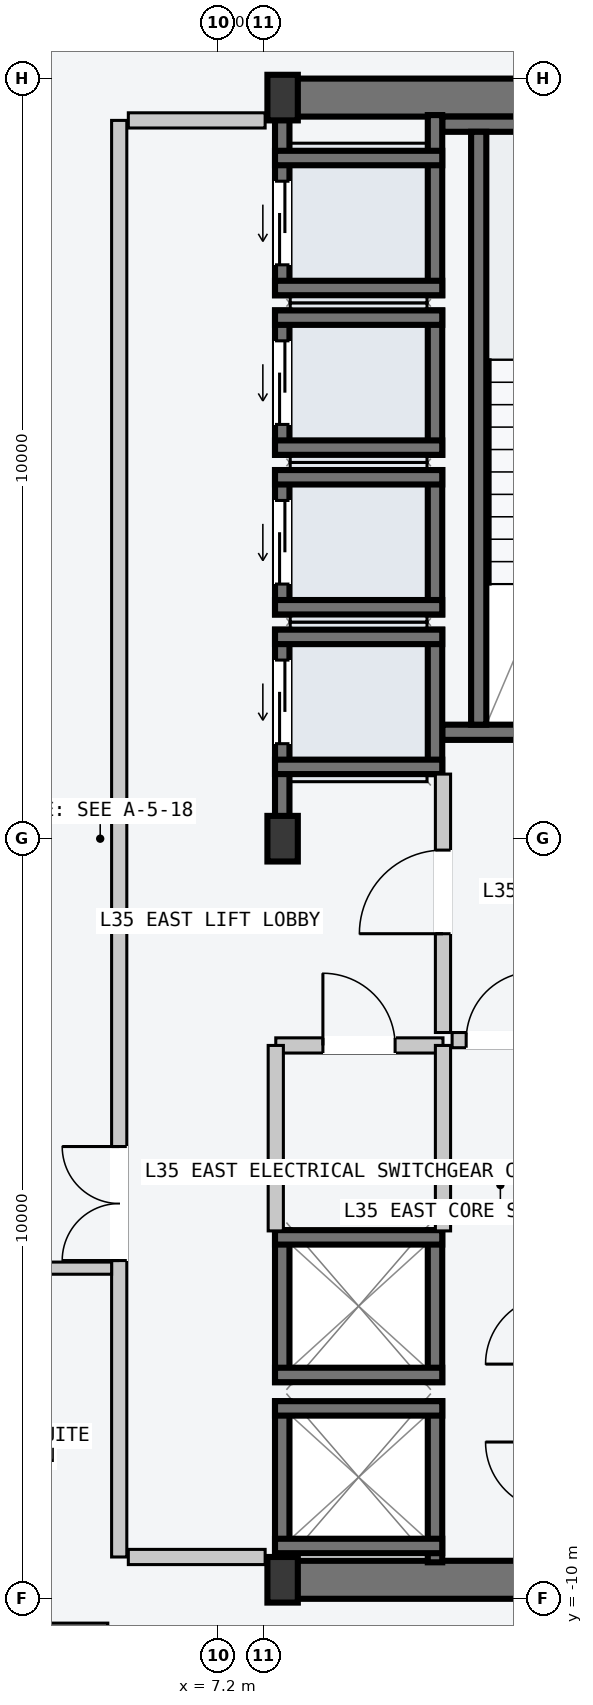
"""IFC4 building model, lengths in metres.
Left out: names, types, materials, properties, quantities, classifications, styles, units other than length and angle.
Written with IfcOpenShell. Run it as: python <this file> out.ifc"""

import sys

from ifc_helpers import new_model, si_unit, direction, frame, frame_2d, origin, origin_2d, place, context, subcontext, project, spatial, rectangle, i_section, extrude, element, fill, save


model = new_model("IFC4")
c1 = context("Model", 3, precision=1e-05, world=origin(), true_north=direction((0.0, 1.0)))
c2 = subcontext(c1, "Body", "Model", "MODEL_VIEW")
j1 = project(units=[si_unit("LENGTHUNIT", "METRE"), si_unit("PLANEANGLEUNIT", "RADIAN")], contexts=[c1])
p1 = place(None, origin())
s1 = spatial("IfcSite", under=j1, at=p1, CompositionType="ELEMENT")
p2 = place(p1, origin())
s2 = spatial("IfcBuilding", under=s1, at=p2, CompositionType="ELEMENT")
p3 = place(p2, frame((0.0, 0.0, 135.0)))
s3 = spatial("IfcBuildingStorey", under=s2, at=p3, CompositionType="ELEMENT", Elevation=135.0)
for number, where, z_axis, x_axis in (
    (1, (8.07, -9.75, -0.2), (0.0, 0.0, 1.0), (1.0, 0.0, 0.0)),
    (2, (8.07, 9.75, -0.2), (0.0, 0.0, 1.0), (1.0, 0.0, 0.0)),
):
    element("IfcWall", number, at=place(p3, frame(where, z_axis=z_axis, x_axis=x_axis)), inside=s3, PredefinedType="SHEAR", context=c2, shape_type="SweptSolid", body=[
        extrude(rectangle(XDim=6.46, YDim=0.5, at=frame_2d((3.23, 0.0))), origin(), (0.0, 0.0, 1.0), 3.6),
    ])
p4 = place(p3, frame((10.15, 1.4, -0.2), z_axis=(0.0, 0.0, 1.0), x_axis=(1.0, 0.0, 0.0)))
e3 = element("IfcWall", 3, at=p4, inside=s3, PredefinedType="SOLIDWALL", context=c2, shape_type="SweptSolid", body=[
    extrude(rectangle(XDim=4.1, YDim=0.2, at=frame_2d((2.05, 0.0))), origin(), (0.0, 0.0, 1.0), 3.6),
])
p5 = place(p4, frame((1.5, 0.0, 0.2)))
e4 = element("IfcOpeningElement", 4, at=p5, cuts=e3, PredefinedType="OPENING", context=c2, shape_type="SweptSolid", body=[
    extrude(rectangle(XDim=1.12, YDim=2.18, at=frame_2d((0.56, 1.09))), frame((0.0, 0.11, 0.0), z_axis=(0.0, -1.0, 0.0), x_axis=(1.0, 0.0, 0.0)), (0.0, 0.0, 1.0), 0.22),
])
p6 = place(p3, frame((10.15, 9.4, -0.2), z_axis=(0.0, 0.0, 1.0), x_axis=(1.0, 0.0, 0.0)))
e5 = element("IfcWall", 5, at=p6, inside=s3, PredefinedType="SOLIDWALL", context=c2, shape_type="SweptSolid", body=[
    extrude(rectangle(XDim=4.1, YDim=0.2, at=frame_2d((2.05, 0.0))), origin(), (0.0, 0.0, 1.0), 3.6),
])
p7 = place(p3, frame((10.63, 1.5, -0.2), z_axis=(0.0, 0.0, 1.0), x_axis=(0.0, 1.0, 0.0)))
e6 = element("IfcWall", 6, at=p7, inside=s3, PredefinedType="SOLIDWALL", context=c2, shape_type="SweptSolid", body=[
    extrude(rectangle(XDim=7.8, YDim=0.2, at=frame_2d((3.9, 0.0))), origin(), (0.0, 0.0, 1.0), 3.6),
])
for number, where, z_axis, x_axis in (
    (7, (8.05, -9.75, 0.0), (0.0, 0.0, 1.0), (1.0, 0.0, 0.0)),
    (8, (8.05, 0.0, 0.0), (0.0, 0.0, 1.0), (1.0, 0.0, 0.0)),
    (9, (8.05, 9.75, 0.0), (0.0, 0.0, 1.0), (1.0, 0.0, 0.0)),
):
    element("IfcColumn", number, at=place(p3, frame(where, z_axis=z_axis, x_axis=x_axis)), inside=s3, PredefinedType="COLUMN", context=c2, shape_type="SweptSolid", body=[
        extrude(i_section(OverallWidth=0.4, OverallDepth=0.6, WebThickness=0.022, FlangeThickness=0.036, at=origin_2d()), origin(), (0.0, 0.0, 1.0), 3.6),
    ])
p8 = place(p3, frame((8.045, 0.21, -0.2), z_axis=(0.0, 0.0, 1.0), x_axis=(0.0, 1.0, 0.0)))
e10 = element("IfcWall", 10, at=p8, inside=s3, PredefinedType="SOLIDWALL", context=c2, shape_type="SweptSolid", body=[
    extrude(rectangle(XDim=2.54, YDim=0.19, at=frame_2d((1.27, 0.0))), origin(), (0.0, 0.0, 1.0), 3.6),
])
p9 = place(p8, frame((1.04, 0.0, 0.2)))
e11 = element("IfcOpeningElement", 11, at=p9, cuts=e10, PredefinedType="OPENING", context=c2, shape_type="SweptSolid", body=[
    extrude(rectangle(XDim=1.1, YDim=2.2, at=frame_2d((0.55, 1.1))), frame((0.0, 0.105, 0.0), z_axis=(0.0, -1.0, 0.0), x_axis=(1.0, 0.0, 0.0)), (0.0, 0.0, 1.0), 0.21),
])
p10 = place(p3, frame((10.055, 0.85, -0.2), z_axis=(0.0, 0.0, 1.0), x_axis=(0.0, 1.0, 0.0)))
e12 = element("IfcWall", 12, at=p10, inside=s3, PredefinedType="SOLIDWALL", context=c2, shape_type="SweptSolid", body=[
    extrude(rectangle(XDim=1.9, YDim=0.19, at=frame_2d((0.95, 0.0))), origin(), (0.0, 0.0, 1.0), 3.6),
])
for number, where, z_axis, x_axis in (
    (13, (7.95, 2.655, -0.2), (0.0, 0.0, 1.0), (1.0, 0.0, 0.0)),
    (14, (7.95, 0.945, -0.2), (0.0, 0.0, 1.0), (1.0, 0.0, 0.0)),
):
    element("IfcWall", number, at=place(p3, frame(where, z_axis=z_axis, x_axis=x_axis)), inside=s3, PredefinedType="SOLIDWALL", context=c2, shape_type="SweptSolid", body=[
        extrude(rectangle(XDim=2.2, YDim=0.19, at=frame_2d((1.1, 0.0))), origin(), (0.0, 0.0, 1.0), 3.6),
    ])
p11 = place(p3, frame((8.045, 2.95, -0.2), z_axis=(0.0, 0.0, 1.0), x_axis=(0.0, 1.0, 0.0)))
e15 = element("IfcWall", 15, at=p11, inside=s3, PredefinedType="SOLIDWALL", context=c2, shape_type="SweptSolid", body=[
    extrude(rectangle(XDim=1.9, YDim=0.19, at=frame_2d((0.95, 0.0))), origin(), (0.0, 0.0, 1.0), 3.6),
])
p12 = place(p11, frame((0.4, 0.0, 0.2)))
e16 = element("IfcOpeningElement", 16, at=p12, cuts=e15, PredefinedType="OPENING", context=c2, shape_type="SweptSolid", body=[
    extrude(rectangle(XDim=1.1, YDim=2.2, at=frame_2d((0.55, 1.1))), frame((0.0, 0.105, 0.0), z_axis=(0.0, -1.0, 0.0), x_axis=(1.0, 0.0, 0.0)), (0.0, 0.0, 1.0), 0.21),
])
p13 = place(p3, frame((10.055, 2.95, -0.2), z_axis=(0.0, 0.0, 1.0), x_axis=(0.0, 1.0, 0.0)))
e17 = element("IfcWall", 17, at=p13, inside=s3, PredefinedType="SOLIDWALL", context=c2, shape_type="SweptSolid", body=[
    extrude(rectangle(XDim=1.9, YDim=0.19, at=frame_2d((0.95, 0.0))), origin(), (0.0, 0.0, 1.0), 3.6),
])
for number, where, z_axis, x_axis in (
    (18, (7.95, 4.755, -0.2), (0.0, 0.0, 1.0), (1.0, 0.0, 0.0)),
    (19, (7.95, 3.045, -0.2), (0.0, 0.0, 1.0), (1.0, 0.0, 0.0)),
):
    element("IfcWall", number, at=place(p3, frame(where, z_axis=z_axis, x_axis=x_axis)), inside=s3, PredefinedType="SOLIDWALL", context=c2, shape_type="SweptSolid", body=[
        extrude(rectangle(XDim=2.2, YDim=0.19, at=frame_2d((1.1, 0.0))), origin(), (0.0, 0.0, 1.0), 3.6),
    ])
p14 = place(p3, frame((8.045, 5.05, -0.2), z_axis=(0.0, 0.0, 1.0), x_axis=(0.0, 1.0, 0.0)))
e20 = element("IfcWall", 20, at=p14, inside=s3, PredefinedType="SOLIDWALL", context=c2, shape_type="SweptSolid", body=[
    extrude(rectangle(XDim=1.9, YDim=0.19, at=frame_2d((0.95, 0.0))), origin(), (0.0, 0.0, 1.0), 3.6),
])
p15 = place(p14, frame((0.4, 0.0, 0.2)))
e21 = element("IfcOpeningElement", 21, at=p15, cuts=e20, PredefinedType="OPENING", context=c2, shape_type="SweptSolid", body=[
    extrude(rectangle(XDim=1.1, YDim=2.2, at=frame_2d((0.55, 1.1))), frame((0.0, 0.105, 0.0), z_axis=(0.0, -1.0, 0.0), x_axis=(1.0, 0.0, 0.0)), (0.0, 0.0, 1.0), 0.21),
])
p16 = place(p3, frame((10.055, 5.05, -0.2), z_axis=(0.0, 0.0, 1.0), x_axis=(0.0, 1.0, 0.0)))
e22 = element("IfcWall", 22, at=p16, inside=s3, PredefinedType="SOLIDWALL", context=c2, shape_type="SweptSolid", body=[
    extrude(rectangle(XDim=1.9, YDim=0.19, at=frame_2d((0.95, 0.0))), origin(), (0.0, 0.0, 1.0), 3.6),
])
for number, where, z_axis, x_axis in (
    (23, (7.95, 6.855, -0.2), (0.0, 0.0, 1.0), (1.0, 0.0, 0.0)),
    (24, (7.95, 5.145, -0.2), (0.0, 0.0, 1.0), (1.0, 0.0, 0.0)),
):
    element("IfcWall", number, at=place(p3, frame(where, z_axis=z_axis, x_axis=x_axis)), inside=s3, PredefinedType="SOLIDWALL", context=c2, shape_type="SweptSolid", body=[
        extrude(rectangle(XDim=2.2, YDim=0.19, at=frame_2d((1.1, 0.0))), origin(), (0.0, 0.0, 1.0), 3.6),
    ])
p17 = place(p3, frame((8.045, 7.15, -0.2), z_axis=(0.0, 0.0, 1.0), x_axis=(0.0, 1.0, 0.0)))
e25 = element("IfcWall", 25, at=p17, inside=s3, PredefinedType="SOLIDWALL", context=c2, shape_type="SweptSolid", body=[
    extrude(rectangle(XDim=2.37, YDim=0.19, at=frame_2d((1.185, 0.0))), origin(), (0.0, 0.0, 1.0), 3.6),
])
p18 = place(p17, frame((0.4, 0.0, 0.2)))
e26 = element("IfcOpeningElement", 26, at=p18, cuts=e25, PredefinedType="OPENING", context=c2, shape_type="SweptSolid", body=[
    extrude(rectangle(XDim=1.1, YDim=2.2, at=frame_2d((0.55, 1.1))), frame((0.0, 0.105, 0.0), z_axis=(0.0, -1.0, 0.0), x_axis=(1.0, 0.0, 0.0)), (0.0, 0.0, 1.0), 0.21),
])
p19 = place(p3, frame((10.055, 7.15, -0.2), z_axis=(0.0, 0.0, 1.0), x_axis=(0.0, 1.0, 0.0)))
e27 = element("IfcWall", 27, at=p19, inside=s3, PredefinedType="SOLIDWALL", context=c2, shape_type="SweptSolid", body=[
    extrude(rectangle(XDim=2.37, YDim=0.19, at=frame_2d((1.185, 0.0))), origin(), (0.0, 0.0, 1.0), 3.6),
])
for number, where, z_axis, x_axis in (
    (28, (7.95, 8.955, -0.2), (0.0, 0.0, 1.0), (1.0, 0.0, 0.0)),
    (29, (7.95, 7.245, -0.2), (0.0, 0.0, 1.0), (1.0, 0.0, 0.0)),
):
    element("IfcWall", number, at=place(p3, frame(where, z_axis=z_axis, x_axis=x_axis)), inside=s3, PredefinedType="SOLIDWALL", context=c2, shape_type="SweptSolid", body=[
        extrude(rectangle(XDim=2.2, YDim=0.19, at=frame_2d((1.1, 0.0))), origin(), (0.0, 0.0, 1.0), 3.6),
    ])
for number, where, z_axis, x_axis in (
    (30, (8.045, -9.52, -0.2), (0.0, 0.0, 1.0), (0.0, 1.0, 0.0)),
    (31, (10.055, -9.52, -0.2), (0.0, 0.0, 1.0), (0.0, 1.0, 0.0)),
):
    element("IfcWall", number, at=place(p3, frame(where, z_axis=z_axis, x_axis=x_axis)), inside=s3, PredefinedType="SOLIDWALL", context=c2, shape_type="SweptSolid", body=[
        extrude(rectangle(XDim=2.12, YDim=0.19, at=frame_2d((1.06, 0.0))), origin(), (0.0, 0.0, 1.0), 3.6),
    ])
for number, where, z_axis, x_axis in (
    (32, (7.95, -7.495, -0.2), (0.0, 0.0, 1.0), (1.0, 0.0, 0.0)),
    (33, (7.95, -9.305, -0.2), (0.0, 0.0, 1.0), (1.0, 0.0, 0.0)),
):
    element("IfcWall", number, at=place(p3, frame(where, z_axis=z_axis, x_axis=x_axis)), inside=s3, PredefinedType="SOLIDWALL", context=c2, shape_type="SweptSolid", body=[
        extrude(rectangle(XDim=2.2, YDim=0.19, at=frame_2d((1.1, 0.0))), origin(), (0.0, 0.0, 1.0), 3.6),
    ])
for number, where, z_axis, x_axis in (
    (34, (8.045, -7.15, -0.2), (0.0, 0.0, 1.0), (0.0, 1.0, 0.0)),
    (35, (10.055, -7.15, -0.2), (0.0, 0.0, 1.0), (0.0, 1.0, 0.0)),
):
    element("IfcWall", number, at=place(p3, frame(where, z_axis=z_axis, x_axis=x_axis)), inside=s3, PredefinedType="SOLIDWALL", context=c2, shape_type="SweptSolid", body=[
        extrude(rectangle(XDim=2.0, YDim=0.19, at=frame_2d((1.0, 0.0))), origin(), (0.0, 0.0, 1.0), 3.6),
    ])
for number, where, z_axis, x_axis in (
    (36, (7.95, -5.245, -0.2), (0.0, 0.0, 1.0), (1.0, 0.0, 0.0)),
    (37, (7.95, -7.055, -0.2), (0.0, 0.0, 1.0), (1.0, 0.0, 0.0)),
):
    element("IfcWall", number, at=place(p3, frame(where, z_axis=z_axis, x_axis=x_axis)), inside=s3, PredefinedType="SOLIDWALL", context=c2, shape_type="SweptSolid", body=[
        extrude(rectangle(XDim=2.2, YDim=0.19, at=frame_2d((1.1, 0.0))), origin(), (0.0, 0.0, 1.0), 3.6),
    ])
p20 = place(p3, frame((5.9, -9.45, 0.0), z_axis=(0.0, 0.0, 1.0), x_axis=(0.0, 1.0, 0.0)))
e38 = element("IfcWall", 38, at=p20, inside=s3, PredefinedType="PARTITIONING", context=c2, shape_type="SweptSolid", body=[
    extrude(rectangle(XDim=18.9, YDim=0.2, at=frame_2d((9.45, 0.0))), origin(), (0.0, 0.0, 1.0), 3.4),
])
p21 = place(p20, frame((3.9, 0.0, 0.0)))
e39 = element("IfcOpeningElement", 39, at=p21, cuts=e38, PredefinedType="OPENING", context=c2, shape_type="SweptSolid", body=[
    extrude(rectangle(XDim=1.5, YDim=2.2, at=frame_2d((0.75, 1.1))), frame((0.0, 0.11, 0.0), z_axis=(0.0, -1.0, 0.0), x_axis=(1.0, 0.0, 0.0)), (0.0, 0.0, 1.0), 0.22),
])
for number, where, z_axis, x_axis in (
    (40, (6.02, -9.45, 0.0), (0.0, 0.0, 1.0), (1.0, 0.0, 0.0)),
    (41, (6.02, 9.45, 0.0), (0.0, 0.0, 1.0), (1.0, 0.0, 0.0)),
):
    element("IfcWall", number, at=place(p3, frame(where, z_axis=z_axis, x_axis=x_axis)), inside=s3, PredefinedType="PARTITIONING", context=c2, shape_type="SweptSolid", body=[
        extrude(rectangle(XDim=1.8, YDim=0.2, at=frame_2d((0.9, 0.0))), origin(), (0.0, 0.0, 1.0), 3.4),
    ])
p22 = place(p3, frame((10.16, -2.55, 0.0), z_axis=(0.0, 0.0, 1.0), x_axis=(0.0, 1.0, 0.0)))
e42 = element("IfcWall", 42, at=p22, inside=s3, PredefinedType="PARTITIONING", context=c2, shape_type="SweptSolid", body=[
    extrude(rectangle(XDim=3.4, YDim=0.2, at=frame_2d((1.7, 0.0))), origin(), (0.0, 0.0, 1.0), 3.4),
])
p23 = place(p22, frame((1.3, 0.0, 0.0)))
e43 = element("IfcOpeningElement", 43, at=p23, cuts=e42, PredefinedType="OPENING", context=c2, shape_type="SweptSolid", body=[
    extrude(rectangle(XDim=1.1, YDim=2.15, at=frame_2d((0.55, 1.075))), frame((0.0, 0.11, 0.0), z_axis=(0.0, -1.0, 0.0), x_axis=(1.0, 0.0, 0.0)), (0.0, 0.0, 1.0), 0.22),
])
p24 = place(p3, frame((10.28, -2.65, 0.0), z_axis=(0.0, 0.0, 1.0), x_axis=(1.0, 0.0, 0.0)))
e44 = element("IfcWall", 44, at=p24, inside=s3, PredefinedType="PARTITIONING", context=c2, shape_type="SweptSolid", body=[
    extrude(rectangle(XDim=1.27, YDim=0.2, at=frame_2d((0.635, 0.0))), origin(), (0.0, 0.0, 1.0), 3.4),
])
p25 = place(p24, frame((0.185, 0.0, 0.0)))
e45 = element("IfcOpeningElement", 45, at=p25, cuts=e44, PredefinedType="OPENING", context=c2, shape_type="SweptSolid", body=[
    extrude(rectangle(XDim=0.9, YDim=2.15, at=frame_2d((0.45, 1.075))), frame((0.0, 0.11, 0.0), z_axis=(0.0, -1.0, 0.0), x_axis=(1.0, 0.0, 0.0)), (0.0, 0.0, 1.0), 0.22),
])
p26 = place(p3, frame((7.96, -2.72, 0.0), z_axis=(0.0, 0.0, 1.0), x_axis=(1.0, 0.0, 0.0)))
e46 = element("IfcWall", 46, at=p26, inside=s3, PredefinedType="PARTITIONING", context=c2, shape_type="SweptSolid", body=[
    extrude(rectangle(XDim=2.2, YDim=0.2, at=frame_2d((1.1, 0.0))), origin(), (0.0, 0.0, 1.0), 3.4),
])
p27 = place(p26, frame((0.62, 0.0, 0.0)))
e47 = element("IfcOpeningElement", 47, at=p27, cuts=e46, PredefinedType="OPENING", context=c2, shape_type="SweptSolid", body=[
    extrude(rectangle(XDim=0.95, YDim=2.1, at=frame_2d((0.475, 1.05))), frame((0.0, 0.11, 0.0), z_axis=(0.0, -1.0, 0.0), x_axis=(1.0, 0.0, 0.0)), (0.0, 0.0, 1.0), 0.22),
])
for number, where, z_axis, x_axis in (
    (48, (7.96, -5.16, 0.0), (0.0, 0.0, 1.0), (0.0, 1.0, 0.0)),
    (49, (10.16, -5.16, 0.0), (0.0, 0.0, 1.0), (0.0, 1.0, 0.0)),
):
    element("IfcWall", number, at=place(p3, frame(where, z_axis=z_axis, x_axis=x_axis)), inside=s3, PredefinedType="PARTITIONING", context=c2, shape_type="SweptSolid", body=[
        extrude(rectangle(XDim=2.44, YDim=0.2, at=frame_2d((1.22, 0.0))), origin(), (0.0, 0.0, 1.0), 3.4),
    ])
p28 = place(p3, frame((-5.8, -5.65, 0.0), z_axis=(0.0, 0.0, 1.0), x_axis=(1.0, 0.0, 0.0)))
e50 = element("IfcWall", 50, at=p28, inside=s3, PredefinedType="PARTITIONING", context=c2, shape_type="SweptSolid", body=[
    extrude(rectangle(XDim=11.6, YDim=0.16, at=frame_2d((5.8, 0.0))), origin(), (0.0, 0.0, 1.0), 3.4),
])
p29 = place(p28, frame((5.1, 0.0, 0.0)))
e51 = element("IfcOpeningElement", 51, at=p29, cuts=e50, PredefinedType="OPENING", context=c2, shape_type="SweptSolid", body=[
    extrude(rectangle(XDim=1.4, YDim=2.2, at=frame_2d((0.7, 1.1))), frame((0.0, 0.09, 0.0), z_axis=(0.0, -1.0, 0.0), x_axis=(1.0, 0.0, 0.0)), (0.0, 0.0, 1.0), 0.18),
])
p30 = place(p3, frame((-5.75, -10.4, 0.0), z_axis=(0.0, 0.0, 1.0), x_axis=(1.0, 0.0, 0.0)))
e52 = element("IfcWall", 52, at=p30, inside=s3, PredefinedType="PARTITIONING", context=c2, shape_type="SweptSolid", body=[
    extrude(rectangle(XDim=11.5, YDim=0.16, at=frame_2d((5.75, 0.0))), origin(), (0.0, 0.0, 1.0), 3.4),
])
p31 = place(p30, frame((4.622, 0.0, 0.0)))
e53 = element("IfcOpeningElement", 53, at=p31, cuts=e52, PredefinedType="OPENING", context=c2, shape_type="SweptSolid", body=[
    extrude(rectangle(XDim=1.24, YDim=2.24, at=frame_2d((0.62, 1.12))), frame((0.0, 0.09, 0.0), z_axis=(0.0, -1.0, 0.0), x_axis=(1.0, 0.0, 0.0)), (0.0, 0.0, 1.0), 0.18),
])
p32 = place(p9, origin())
e54 = element("IfcDoor", 54, at=p32, inside=s3, OperationType="SLIDING_TO_LEFT", PredefinedType="DOOR", context=c2, shape_type="SweptSolid", body=[
    extrude(rectangle(XDim=1.1, YDim=2.2, at=frame_2d((0.55, 1.1))), frame((0.0, 0.025, 0.0), z_axis=(0.0, -1.0, 0.0), x_axis=(1.0, 0.0, 0.0)), (0.0, 0.0, 1.0), 0.05),
])
fill(e11, e54)
p33 = place(p12, origin())
e55 = element("IfcDoor", 55, at=p33, inside=s3, OperationType="SLIDING_TO_LEFT", PredefinedType="DOOR", context=c2, shape_type="SweptSolid", body=[
    extrude(rectangle(XDim=1.1, YDim=2.2, at=frame_2d((0.55, 1.1))), frame((0.0, 0.025, 0.0), z_axis=(0.0, -1.0, 0.0), x_axis=(1.0, 0.0, 0.0)), (0.0, 0.0, 1.0), 0.05),
])
fill(e16, e55)
p34 = place(p15, origin())
e56 = element("IfcDoor", 56, at=p34, inside=s3, OperationType="SLIDING_TO_LEFT", PredefinedType="DOOR", context=c2, shape_type="SweptSolid", body=[
    extrude(rectangle(XDim=1.1, YDim=2.2, at=frame_2d((0.55, 1.1))), frame((0.0, 0.025, 0.0), z_axis=(0.0, -1.0, 0.0), x_axis=(1.0, 0.0, 0.0)), (0.0, 0.0, 1.0), 0.05),
])
fill(e21, e56)
p35 = place(p18, origin())
e57 = element("IfcDoor", 57, at=p35, inside=s3, OperationType="SLIDING_TO_LEFT", PredefinedType="DOOR", context=c2, shape_type="SweptSolid", body=[
    extrude(rectangle(XDim=1.1, YDim=2.2, at=frame_2d((0.55, 1.1))), frame((0.0, 0.025, 0.0), z_axis=(0.0, -1.0, 0.0), x_axis=(1.0, 0.0, 0.0)), (0.0, 0.0, 1.0), 0.05),
])
fill(e26, e57)
p36 = place(p21, origin())
e58 = element("IfcDoor", 58, at=p36, inside=s3, OperationType="DOUBLE_DOOR_SINGLE_SWING", PredefinedType="DOOR", context=c2, shape_type="SweptSolid", body=[
    extrude(rectangle(XDim=1.5, YDim=2.2, at=frame_2d((0.75, 1.1))), frame((0.0, 0.025, 0.0), z_axis=(0.0, -1.0, 0.0), x_axis=(1.0, 0.0, 0.0)), (0.0, 0.0, 1.0), 0.05),
])
fill(e39, e58)
p37 = place(p23, origin())
e59 = element("IfcDoor", 59, at=p37, inside=s3, OperationType="SINGLE_SWING_LEFT", PredefinedType="DOOR", context=c2, shape_type="SweptSolid", body=[
    extrude(rectangle(XDim=1.1, YDim=2.15, at=frame_2d((0.55, 1.075))), frame((0.0, 0.025, 0.0), z_axis=(0.0, -1.0, 0.0), x_axis=(1.0, 0.0, 0.0)), (0.0, 0.0, 1.0), 0.05),
])
fill(e43, e59)
p38 = place(p25, origin())
e60 = element("IfcDoor", 60, at=p38, inside=s3, OperationType="SINGLE_SWING_RIGHT", PredefinedType="DOOR", context=c2, shape_type="SweptSolid", body=[
    extrude(rectangle(XDim=0.9, YDim=2.15, at=frame_2d((0.45, 1.075))), frame((0.0, 0.025, 0.0), z_axis=(0.0, -1.0, 0.0), x_axis=(1.0, 0.0, 0.0)), (0.0, 0.0, 1.0), 0.05),
])
fill(e45, e60)
p39 = place(p27, origin())
e61 = element("IfcDoor", 61, at=p39, inside=s3, OperationType="SINGLE_SWING_LEFT", PredefinedType="DOOR", context=c2, shape_type="SweptSolid", body=[
    extrude(rectangle(XDim=0.95, YDim=2.1, at=frame_2d((0.475, 1.05))), frame((0.0, 0.025, 0.0), z_axis=(0.0, -1.0, 0.0), x_axis=(1.0, 0.0, 0.0)), (0.0, 0.0, 1.0), 0.05),
])
fill(e47, e61)
save(model, sys.argv[1])
